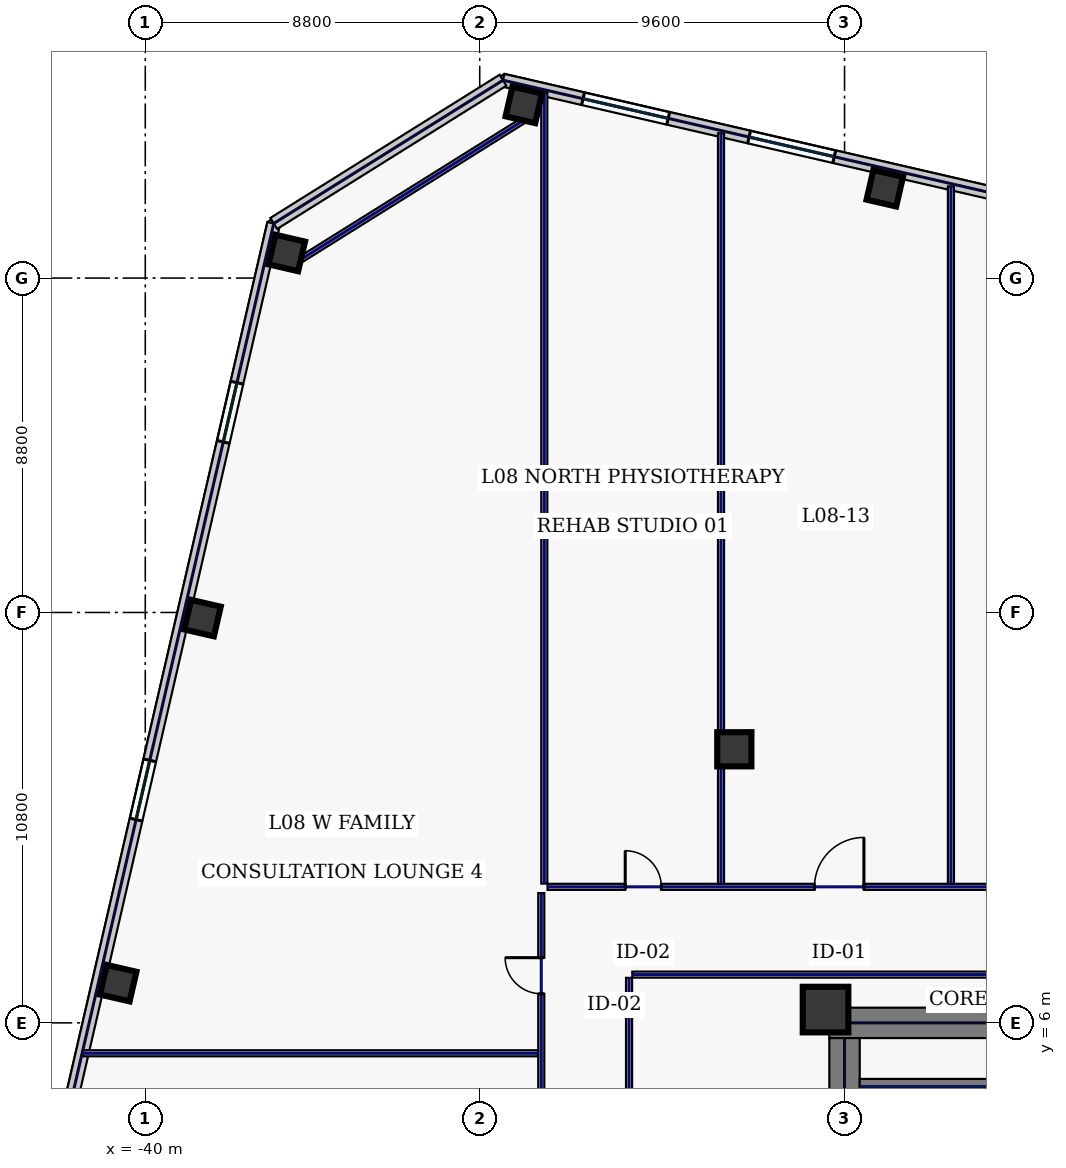
"""IFC4 building model, lengths in metres.
Left out: names, types, materials, properties, quantities, classifications, styles, units other than length and angle.
Written with IfcOpenShell. Run it as: python <this file> out.ifc"""

import sys

from ifc_helpers import new_model, si_unit, direction, frame, frame_2d, origin, origin_2d, place, context, subcontext, project, spatial, rectangle, hollow_rectangle, extrude, element, fill, save


model = new_model("IFC4")
c1 = context("Model", 3, precision=1e-05, world=origin(), true_north=direction((0.0, 1.0)))
c2 = subcontext(c1, "Body", "Model", "MODEL_VIEW")
j1 = project(units=[si_unit("LENGTHUNIT", "METRE"), si_unit("PLANEANGLEUNIT", "RADIAN")], contexts=[c1])
p1 = place(None, origin())
s1 = spatial("IfcSite", under=j1, at=p1, CompositionType="ELEMENT")
p2 = place(p1, origin())
s2 = spatial("IfcBuilding", under=s1, at=p2, CompositionType="ELEMENT")
p3 = place(p2, frame((0.0, 0.0, 43.4)))
s3 = spatial("IfcBuildingStorey", under=s2, at=p3, CompositionType="ELEMENT", Elevation=43.4)
p4 = place(p3, frame((-22.0, 6.0, 0.0), z_axis=(0.0, 0.0, 1.0), x_axis=(1.0, 0.0, 0.0)))
e1 = element("IfcWall", 1, at=p4, inside=s3, PredefinedType="SHEAR", context=c2, shape_type="SweptSolid", body=[
    extrude(rectangle(XDim=11.6, YDim=0.8, at=frame_2d((5.8, 0.0))), origin(), (0.0, 0.0, 1.0), 3.74),
])
p5 = place(p3, frame((-21.6, -5.6, 0.0), z_axis=(0.0, 0.0, 1.0), x_axis=(0.0, 1.0, 0.0)))
e2 = element("IfcWall", 2, at=p5, inside=s3, PredefinedType="SHEAR", context=c2, shape_type="SweptSolid", body=[
    extrude(rectangle(XDim=11.2, YDim=0.8, at=frame_2d((5.6, 0.0))), origin(), (0.0, 0.0, 1.0), 3.74),
])
p6 = place(p3, frame((-21.2, 4.325, 0.0), z_axis=(0.0, 0.0, 1.0), x_axis=(1.0, 0.0, 0.0)))
e3 = element("IfcWall", 3, at=p6, inside=s3, PredefinedType="SHEAR", context=c2, shape_type="SweptSolid", body=[
    extrude(rectangle(XDim=3.4, YDim=0.4, at=frame_2d((1.7, 0.0))), origin(), (0.0, 0.0, 1.0), 3.74),
])
p7 = place(p3, frame((-22.1, 6.35, 0.0), z_axis=(0.0, 0.0, 1.0), x_axis=(1.0, 0.0, 0.0)))
e4 = element("IfcColumn", 4, at=p7, inside=s3, PredefinedType="COLUMN", context=c2, shape_type="SweptSolid", body=[
    extrude(hollow_rectangle(XDim=1.2, YDim=1.2, WallThickness=0.05, at=origin_2d()), origin(), (0.0, 0.0, 1.0), 3.74),
])
p8 = place(p3, frame((-24.5, 13.2, 0.0), z_axis=(0.0, 0.0, 1.0), x_axis=(1.0, 0.0, 0.0)))
e5 = element("IfcColumn", 5, at=p8, inside=s3, PredefinedType="COLUMN", context=c2, shape_type="SweptSolid", body=[
    extrude(hollow_rectangle(XDim=0.9, YDim=0.9, WallThickness=0.04, at=origin_2d()), origin(), (0.0, 0.0, 1.0), 3.74),
])
for number, where, z_axis, x_axis in (
    (6, (-20.541, 27.964, 0.0), (0.0, 0.0, 1.0), (0.974, -0.225, 0.0)),
    (7, (-30.04, 30.156, 0.0), (0.0, 0.0, 1.0), (0.974, -0.225, 0.0)),
    (8, (-36.276, 26.26, 0.0), (0.0, 0.0, 1.0), (0.974, -0.225, 0.0)),
    (9, (-38.494, 16.652, 0.0), (0.0, 0.0, 1.0), (0.974, -0.225, 0.0)),
    (10, (-40.712, 7.045, 0.0), (0.0, 0.0, 1.0), (0.974, -0.225, 0.0)),
):
    element("IfcColumn", number, at=place(p3, frame(where, z_axis=z_axis, x_axis=x_axis)), inside=s3, PredefinedType="COLUMN", context=c2, shape_type="SweptSolid", body=[
        extrude(hollow_rectangle(XDim=0.8, YDim=0.8, WallThickness=0.036, at=origin_2d()), origin(), (0.0, 0.0, 1.0), 3.74),
    ])
p9 = place(p3, frame((-8.517, 25.711, 0.0), z_axis=(0.0, 0.0, 1.0), x_axis=(-0.974372845456, 0.224939009598, 0.0)))
e11 = element("IfcWall", 11, at=p9, inside=s3, PredefinedType="STANDARD", context=c2, shape_type="SweptSolid", body=[
    extrude(rectangle(XDim=22.652, YDim=0.34, at=frame_2d((11.326, 0.0))), origin(), (0.0, 0.0, 1.0), 3.74),
])
p10 = place(p9, frame((18.189, 0.0, 0.77)))
e12 = element("IfcOpeningElement", 12, at=p10, cuts=e11, PredefinedType="OPENING", context=c2, shape_type="SweptSolid", body=[
    extrude(rectangle(XDim=2.3, YDim=2.1, at=frame_2d((1.15, 1.05))), frame((0.0, 0.18, 0.0), z_axis=(0.0, -1.0, 0.0), x_axis=(1.0, 0.0, 0.0)), (0.0, 0.0, 1.0), 0.36),
])
p11 = place(p9, frame((13.705, 0.0, 0.77)))
e13 = element("IfcOpeningElement", 13, at=p11, cuts=e11, PredefinedType="OPENING", context=c2, shape_type="SweptSolid", body=[
    extrude(rectangle(XDim=2.3, YDim=2.1, at=frame_2d((1.15, 1.05))), frame((0.0, 0.18, 0.0), z_axis=(0.0, -1.0, 0.0), x_axis=(1.0, 0.0, 0.0)), (0.0, 0.0, 1.0), 0.36),
])
p12 = place(p9, frame((8.441, 0.0, 0.77)))
e14 = element("IfcOpeningElement", 14, at=p12, cuts=e11, PredefinedType="OPENING", context=c2, shape_type="SweptSolid", body=[
    extrude(rectangle(XDim=0.85, YDim=1.85, at=frame_2d((0.425, 0.925))), frame((0.0, 0.18, 0.0), z_axis=(0.0, -1.0, 0.0), x_axis=(1.0, 0.0, 0.0)), (0.0, 0.0, 1.0), 0.36),
])
p13 = place(p3, frame((-36.62, 27.037, 0.0), z_axis=(0.0, 0.0, 1.0), x_axis=(-0.224951280646, -0.974370012539, 0.0)))
e15 = element("IfcWall", 15, at=p13, inside=s3, PredefinedType="STANDARD", context=c2, shape_type="SweptSolid", body=[
    extrude(rectangle(XDim=40.8, YDim=0.34, at=frame_2d((20.4, 0.0))), origin(), (0.0, 0.0, 1.0), 3.74),
])
p14 = place(p13, frame((4.3, 0.0, 0.58)))
e16 = element("IfcOpeningElement", 16, at=p14, cuts=e15, PredefinedType="OPENING", context=c2, shape_type="SweptSolid", body=[
    extrude(rectangle(XDim=1.6, YDim=2.3, at=frame_2d((0.8, 1.15))), frame((0.0, 0.18, 0.0), z_axis=(0.0, -1.0, 0.0), x_axis=(1.0, 0.0, 0.0)), (0.0, 0.0, 1.0), 0.36),
])
p15 = place(p13, frame((14.5, 0.0, 0.58)))
e17 = element("IfcOpeningElement", 17, at=p15, cuts=e15, PredefinedType="OPENING", context=c2, shape_type="SweptSolid", body=[
    extrude(rectangle(XDim=1.6, YDim=2.3, at=frame_2d((0.8, 1.15))), frame((0.0, 0.18, 0.0), z_axis=(0.0, -1.0, 0.0), x_axis=(1.0, 0.0, 0.0)), (0.0, 0.0, 1.0), 0.36),
])
p16 = place(p13, frame((24.35, 0.0, 0.75)))
e18 = element("IfcOpeningElement", 18, at=p16, cuts=e15, PredefinedType="OPENING", context=c2, shape_type="SweptSolid", body=[
    extrude(rectangle(XDim=0.85, YDim=1.85, at=frame_2d((0.425, 0.925))), frame((0.0, 0.18, 0.0), z_axis=(0.0, -1.0, 0.0), x_axis=(1.0, 0.0, 0.0)), (0.0, 0.0, 1.0), 0.36),
])
p17 = place(p13, frame((34.9, 0.0, 0.58)))
e19 = element("IfcOpeningElement", 19, at=p17, cuts=e15, PredefinedType="OPENING", context=c2, shape_type="SweptSolid", body=[
    extrude(rectangle(XDim=1.6, YDim=2.3, at=frame_2d((0.8, 1.15))), frame((0.0, 0.18, 0.0), z_axis=(0.0, -1.0, 0.0), x_axis=(1.0, 0.0, 0.0)), (0.0, 0.0, 1.0), 0.36),
])
p18 = place(p3, frame((-30.588, 30.807, 0.0), z_axis=(0.0, 0.0, 1.0), x_axis=(-0.848031080615, -0.529946493819, 0.0)))
e20 = element("IfcWall", 20, at=p18, inside=s3, PredefinedType="STANDARD", context=c2, shape_type="SweptSolid", body=[
    extrude(rectangle(XDim=7.114, YDim=0.34, at=frame_2d((3.557, 0.0))), origin(), (0.0, 0.0, 1.0), 3.74),
])
p19 = place(p3, frame((-29.86, 29.868, 0.0), z_axis=(0.0, 0.0, 1.0), x_axis=(-0.848043064089, -0.529927317139, 0.0)))
e21 = element("IfcWall", 21, at=p19, inside=s3, PredefinedType="PARTITIONING", context=c2, shape_type="SweptSolid", body=[
    extrude(rectangle(XDim=7.354, YDim=0.16, at=frame_2d((3.677, 0.0))), origin(), (0.0, 0.0, 1.0), 3.74),
])
p20 = place(p3, frame((-29.58, -9.215, 0.0), z_axis=(0.0, 0.0, 1.0), x_axis=(0.0, 1.0, 0.0)))
e22 = element("IfcWall", 22, at=p20, inside=s3, PredefinedType="PARTITIONING", context=c2, shape_type="SweptSolid", body=[
    extrude(rectangle(XDim=18.63, YDim=0.16, at=frame_2d((9.315, 0.0))), origin(), (0.0, 0.0, 1.0), 3.74),
])
p21 = place(p20, frame((1.769, 0.0, 0.0)))
e23 = element("IfcOpeningElement", 23, at=p21, cuts=e22, PredefinedType="OPENING", context=c2, shape_type="SweptSolid", body=[
    extrude(rectangle(XDim=0.95, YDim=2.2, at=frame_2d((0.475, 1.1))), frame((0.0, 0.09, 0.0), z_axis=(0.0, -1.0, 0.0), x_axis=(1.0, 0.0, 0.0)), (0.0, 0.0, 1.0), 0.18),
])
p22 = place(p20, frame((6.85, 0.0, 0.0)))
e24 = element("IfcOpeningElement", 24, at=p22, cuts=e22, PredefinedType="OPENING", context=c2, shape_type="SweptSolid", body=[
    extrude(rectangle(XDim=0.95, YDim=2.2, at=frame_2d((0.475, 1.1))), frame((0.0, 0.09, 0.0), z_axis=(0.0, -1.0, 0.0), x_axis=(1.0, 0.0, 0.0)), (0.0, 0.0, 1.0), 0.18),
])
p23 = place(p20, frame((12.05, 0.0, 0.0)))
e25 = element("IfcOpeningElement", 25, at=p23, cuts=e22, PredefinedType="OPENING", context=c2, shape_type="SweptSolid", body=[
    extrude(rectangle(XDim=0.95, YDim=2.2, at=frame_2d((0.475, 1.1))), frame((0.0, 0.09, 0.0), z_axis=(0.0, -1.0, 0.0), x_axis=(1.0, 0.0, 0.0)), (0.0, 0.0, 1.0), 0.18),
])
p24 = place(p20, frame((15.981, 0.0, 0.0)))
e26 = element("IfcOpeningElement", 26, at=p24, cuts=e22, PredefinedType="OPENING", context=c2, shape_type="SweptSolid", body=[
    extrude(rectangle(XDim=0.95, YDim=2.2, at=frame_2d((0.475, 1.1))), frame((0.0, 0.09, 0.0), z_axis=(0.0, -1.0, 0.0), x_axis=(1.0, 0.0, 0.0)), (0.0, 0.0, 1.0), 0.18),
])
p25 = place(p3, frame((-29.415, 9.58, 0.0), z_axis=(0.0, 0.0, 1.0), x_axis=(1.0, 0.0, 0.0)))
e27 = element("IfcWall", 27, at=p25, inside=s3, PredefinedType="PARTITIONING", context=c2, shape_type="SweptSolid", body=[
    extrude(rectangle(XDim=43.65, YDim=0.16, at=frame_2d((21.825, 0.0))), origin(), (0.0, 0.0, 1.0), 3.74),
])
p26 = place(p25, frame((2.044, 0.0, 0.0)))
e28 = element("IfcOpeningElement", 28, at=p26, cuts=e27, PredefinedType="OPENING", context=c2, shape_type="SweptSolid", body=[
    extrude(rectangle(XDim=0.95, YDim=2.2, at=frame_2d((0.475, 1.1))), frame((0.0, 0.09, 0.0), z_axis=(0.0, -1.0, 0.0), x_axis=(1.0, 0.0, 0.0)), (0.0, 0.0, 1.0), 0.18),
])
p27 = place(p25, frame((7.025, 0.0, 0.0)))
e29 = element("IfcOpeningElement", 29, at=p27, cuts=e27, PredefinedType="OPENING", context=c2, shape_type="SweptSolid", body=[
    extrude(rectangle(XDim=1.3, YDim=2.2, at=frame_2d((0.65, 1.1))), frame((0.0, 0.09, 0.0), z_axis=(0.0, -1.0, 0.0), x_axis=(1.0, 0.0, 0.0)), (0.0, 0.0, 1.0), 0.18),
])
p28 = place(p25, frame((12.75, 0.0, 0.0)))
e30 = element("IfcOpeningElement", 30, at=p28, cuts=e27, PredefinedType="OPENING", context=c2, shape_type="SweptSolid", body=[
    extrude(rectangle(XDim=1.15, YDim=2.2, at=frame_2d((0.575, 1.1))), frame((0.0, 0.09, 0.0), z_axis=(0.0, -1.0, 0.0), x_axis=(1.0, 0.0, 0.0)), (0.0, 0.0, 1.0), 0.18),
])
p29 = place(p25, frame((17.35, 0.0, 0.0)))
e31 = element("IfcOpeningElement", 31, at=p29, cuts=e27, PredefinedType="OPENING", context=c2, shape_type="SweptSolid", body=[
    extrude(rectangle(XDim=0.95, YDim=2.2, at=frame_2d((0.475, 1.1))), frame((0.0, 0.09, 0.0), z_axis=(0.0, -1.0, 0.0), x_axis=(1.0, 0.0, 0.0)), (0.0, 0.0, 1.0), 0.18),
])
p30 = place(p25, frame((22.2, 0.0, 0.0)))
e32 = element("IfcOpeningElement", 32, at=p30, cuts=e27, PredefinedType="OPENING", context=c2, shape_type="SweptSolid", body=[
    extrude(rectangle(XDim=0.95, YDim=2.2, at=frame_2d((0.475, 1.1))), frame((0.0, 0.09, 0.0), z_axis=(0.0, -1.0, 0.0), x_axis=(1.0, 0.0, 0.0)), (0.0, 0.0, 1.0), 0.18),
])
p31 = place(p25, frame((27.3, 0.0, 0.0)))
e33 = element("IfcOpeningElement", 33, at=p31, cuts=e27, PredefinedType="OPENING", context=c2, shape_type="SweptSolid", body=[
    extrude(rectangle(XDim=0.95, YDim=2.2, at=frame_2d((0.475, 1.1))), frame((0.0, 0.09, 0.0), z_axis=(0.0, -1.0, 0.0), x_axis=(1.0, 0.0, 0.0)), (0.0, 0.0, 1.0), 0.18),
])
p32 = place(p25, frame((34.55, 0.0, 0.0)))
e34 = element("IfcOpeningElement", 34, at=p32, cuts=e27, PredefinedType="OPENING", context=c2, shape_type="SweptSolid", body=[
    extrude(rectangle(XDim=1.3, YDim=2.2, at=frame_2d((0.65, 1.1))), frame((0.0, 0.09, 0.0), z_axis=(0.0, -1.0, 0.0), x_axis=(1.0, 0.0, 0.0)), (0.0, 0.0, 1.0), 0.18),
])
p33 = place(p3, frame((-10.665, 7.27, 0.0), z_axis=(0.0, 0.0, 1.0), x_axis=(-1.0, 0.0, 0.0)))
e35 = element("IfcWall", 35, at=p33, inside=s3, PredefinedType="PARTITIONING", context=c2, shape_type="SweptSolid", body=[
    extrude(rectangle(XDim=16.52, YDim=0.16, at=frame_2d((8.26, 0.0))), origin(), (0.0, 0.0, 1.0), 3.74),
])
p34 = place(p3, frame((-27.27, 7.185, 0.0), z_axis=(0.0, 0.0, 1.0), x_axis=(0.0, -1.0, 0.0)))
e36 = element("IfcWall", 36, at=p34, inside=s3, PredefinedType="PARTITIONING", context=c2, shape_type="SweptSolid", body=[
    extrude(rectangle(XDim=14.17, YDim=0.16, at=frame_2d((7.085, 0.0))), origin(), (0.0, 0.0, 1.0), 3.74),
])
p35 = place(p3, frame((-29.5, 9.665, 0.0), z_axis=(0.0, 0.0, 1.0), x_axis=(0.0, 1.0, 0.0)))
e37 = element("IfcWall", 37, at=p35, inside=s3, PredefinedType="PARTITIONING", context=c2, shape_type="SweptSolid", body=[
    extrude(rectangle(XDim=20.819, YDim=0.16, at=frame_2d((10.409, 0.0))), origin(), (0.0, 0.0, 1.0), 3.74),
])
p36 = place(p3, frame((-24.85, 9.665, 0.0), z_axis=(0.0, 0.0, 1.0), x_axis=(0.0, 1.0, 0.0)))
e38 = element("IfcWall", 38, at=p36, inside=s3, PredefinedType="PARTITIONING", context=c2, shape_type="SweptSolid", body=[
    extrude(rectangle(XDim=19.745, YDim=0.16, at=frame_2d((9.873, 0.0))), origin(), (0.0, 0.0, 1.0), 3.74),
])
p37 = place(p3, frame((-18.8, 9.665, 0.0), z_axis=(0.0, 0.0, 1.0), x_axis=(0.0, 1.0, 0.0)))
e39 = element("IfcWall", 39, at=p37, inside=s3, PredefinedType="PARTITIONING", context=c2, shape_type="SweptSolid", body=[
    extrude(rectangle(XDim=18.348, YDim=0.16, at=frame_2d((9.174, 0.0))), origin(), (0.0, 0.0, 1.0), 3.74),
])
p38 = place(p3, frame((-41.641, 5.2, 0.0), z_axis=(0.0, 0.0, 1.0), x_axis=(1.0, 0.0, 0.0)))
e40 = element("IfcWall", 40, at=p38, inside=s3, PredefinedType="PARTITIONING", context=c2, shape_type="SweptSolid", body=[
    extrude(rectangle(XDim=11.976, YDim=0.16, at=frame_2d((5.988, 0.0))), origin(), (0.0, 0.0, 1.0), 3.74),
])
p39 = place(p10, origin())
e41 = element("IfcWindow", 41, at=p39, inside=s3, PartitioningType="SINGLE_PANEL", PredefinedType="WINDOW", context=c2, shape_type="SweptSolid", body=[
    extrude(rectangle(XDim=2.3, YDim=2.1, at=frame_2d((1.15, 1.05))), frame((0.0, 0.03, 0.0), z_axis=(0.0, -1.0, 0.0), x_axis=(1.0, 0.0, 0.0)), (0.0, 0.0, 1.0), 0.06),
])
fill(e12, e41)
p40 = place(p11, origin())
e42 = element("IfcWindow", 42, at=p40, inside=s3, PartitioningType="SINGLE_PANEL", PredefinedType="WINDOW", context=c2, shape_type="SweptSolid", body=[
    extrude(rectangle(XDim=2.3, YDim=2.1, at=frame_2d((1.15, 1.05))), frame((0.0, 0.03, 0.0), z_axis=(0.0, -1.0, 0.0), x_axis=(1.0, 0.0, 0.0)), (0.0, 0.0, 1.0), 0.06),
])
fill(e13, e42)
p41 = place(p14, origin())
e43 = element("IfcWindow", 43, at=p41, inside=s3, PartitioningType="SINGLE_PANEL", PredefinedType="WINDOW", context=c2, shape_type="SweptSolid", body=[
    extrude(rectangle(XDim=1.6, YDim=2.3, at=frame_2d((0.8, 1.15))), frame((0.0, 0.03, 0.0), z_axis=(0.0, -1.0, 0.0), x_axis=(1.0, 0.0, 0.0)), (0.0, 0.0, 1.0), 0.06),
])
fill(e16, e43)
p42 = place(p15, origin())
e44 = element("IfcWindow", 44, at=p42, inside=s3, PartitioningType="SINGLE_PANEL", PredefinedType="WINDOW", context=c2, shape_type="SweptSolid", body=[
    extrude(rectangle(XDim=1.6, YDim=2.3, at=frame_2d((0.8, 1.15))), frame((0.0, 0.03, 0.0), z_axis=(0.0, -1.0, 0.0), x_axis=(1.0, 0.0, 0.0)), (0.0, 0.0, 1.0), 0.06),
])
fill(e17, e44)
p43 = place(p26, origin())
e45 = element("IfcDoor", 45, at=p43, inside=s3, OperationType="SINGLE_SWING_LEFT", PredefinedType="DOOR", context=c2, shape_type="SweptSolid", body=[
    extrude(rectangle(XDim=0.95, YDim=2.2, at=frame_2d((0.475, 1.1))), frame((0.0, 0.025, 0.0), z_axis=(0.0, -1.0, 0.0), x_axis=(1.0, 0.0, 0.0)), (0.0, 0.0, 1.0), 0.05),
])
fill(e28, e45)
p44 = place(p27, origin())
e46 = element("IfcDoor", 46, at=p44, inside=s3, OperationType="SINGLE_SWING_RIGHT", PredefinedType="DOOR", context=c2, shape_type="SweptSolid", body=[
    extrude(rectangle(XDim=1.3, YDim=2.2, at=frame_2d((0.65, 1.1))), frame((0.0, 0.025, 0.0), z_axis=(0.0, -1.0, 0.0), x_axis=(1.0, 0.0, 0.0)), (0.0, 0.0, 1.0), 0.05),
])
fill(e29, e46)
p45 = place(p24, origin())
e47 = element("IfcDoor", 47, at=p45, inside=s3, OperationType="SINGLE_SWING_RIGHT", PredefinedType="DOOR", context=c2, shape_type="SweptSolid", body=[
    extrude(rectangle(XDim=0.95, YDim=2.2, at=frame_2d((0.475, 1.1))), frame((0.0, 0.025, 0.0), z_axis=(0.0, -1.0, 0.0), x_axis=(1.0, 0.0, 0.0)), (0.0, 0.0, 1.0), 0.05),
])
fill(e26, e47)
save(model, sys.argv[1])
